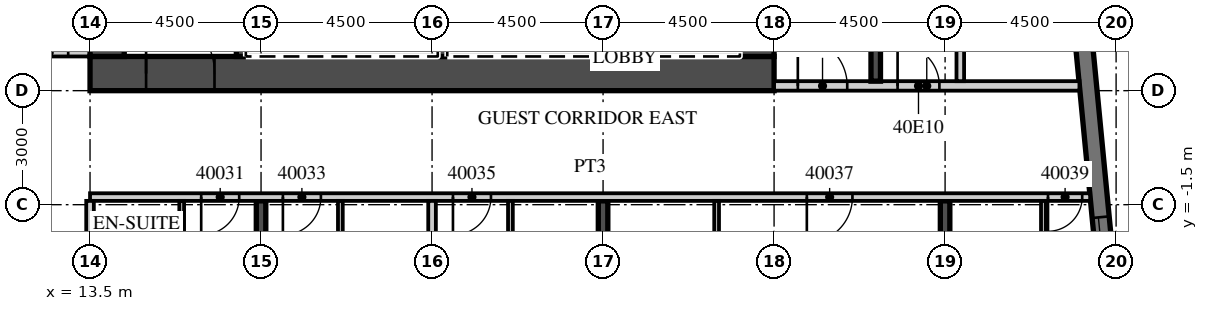
"""IFC4 building model, lengths in metres.
Left out: names, types, materials, properties, quantities, classifications, styles, units other than length and angle.
Written with IfcOpenShell. Run it as: python <this file> out.ifc"""

import sys

from ifc_helpers import new_model, si_unit, direction, frame, frame_2d, origin, place, context, subcontext, project, spatial, rectangle, extrude, element, fill, save


model = new_model("IFC4")
c1 = context("Model", 3, precision=1e-05, world=origin(), true_north=direction((0.0, 1.0)))
c2 = subcontext(c1, "Body", "Model", "MODEL_VIEW")
j1 = project(units=[si_unit("LENGTHUNIT", "METRE"), si_unit("PLANEANGLEUNIT", "RADIAN")], contexts=[c1])
p1 = place(None, origin())
s1 = spatial("IfcSite", under=j1, at=p1, CompositionType="ELEMENT")
p2 = place(p1, origin())
s2 = spatial("IfcBuilding", under=s1, at=p2, CompositionType="ELEMENT")
p3 = place(p2, frame((0.0, 0.0, 173.5)))
s3 = spatial("IfcBuildingStorey", under=s2, at=p3, CompositionType="ELEMENT", Elevation=173.5)
p4 = place(p3, frame((18.0, -19.245, 0.0), z_axis=(0.0, 0.0, 1.0), x_axis=(0.0, 1.0, 0.0)))
e1 = element("IfcWall", 1, at=p4, inside=s3, PredefinedType="SHEAR", context=c2, shape_type="SweptSolid", body=[
    extrude(rectangle(XDim=17.845, YDim=0.25, at=frame_2d((8.923, 0.0))), origin(), (0.0, 0.0, 1.0), 3.3),
])
p5 = place(p3, frame((27.0, -18.379, 0.0), z_axis=(0.0, 0.0, 1.0), x_axis=(0.0, 1.0, 0.0)))
e2 = element("IfcWall", 2, at=p5, inside=s3, PredefinedType="SHEAR", context=c2, shape_type="SweptSolid", body=[
    extrude(rectangle(XDim=16.979, YDim=0.25, at=frame_2d((8.489, 0.0))), origin(), (0.0, 0.0, 1.0), 3.3),
])
p6 = place(p3, frame((36.0, -17.512, 0.0), z_axis=(0.0, 0.0, 1.0), x_axis=(0.0, 1.0, 0.0)))
e3 = element("IfcWall", 3, at=p6, inside=s3, PredefinedType="SHEAR", context=c2, shape_type="SweptSolid", body=[
    extrude(rectangle(XDim=16.112, YDim=0.25, at=frame_2d((8.056, 0.0))), origin(), (0.0, 0.0, 1.0), 3.3),
])
p7 = place(p3, frame((41.214, -13.466, 0.0), z_axis=(0.0, 0.0, 1.0), x_axis=(-0.095847314626, 0.995396047952, 0.0)))
e4 = element("IfcWall", 4, at=p7, inside=s3, PredefinedType="SOLIDWALL", context=c2, shape_type="SweptSolid", body=[
    extrude(rectangle(XDim=34.0, YDim=0.45, at=frame_2d((17.0, 0.0))), origin(), (0.0, 0.0, 1.0), 3.02),
])
p8 = place(p7, frame((3.869, 0.0, 0.45)))
e5 = element("IfcOpeningElement", 5, at=p8, cuts=e4, PredefinedType="OPENING", context=c2, shape_type="SweptSolid", body=[
    extrude(rectangle(XDim=3.3, YDim=2.25, at=frame_2d((1.65, 1.125))), frame((0.0, 0.235, 0.0), z_axis=(0.0, -1.0, 0.0), x_axis=(1.0, 0.0, 0.0)), (0.0, 0.0, 1.0), 0.47),
])
p9 = place(p7, frame((8.39, 0.0, 0.45)))
e6 = element("IfcOpeningElement", 6, at=p9, cuts=e4, PredefinedType="OPENING", context=c2, shape_type="SweptSolid", body=[
    extrude(rectangle(XDim=3.3, YDim=2.25, at=frame_2d((1.65, 1.125))), frame((0.0, 0.235, 0.0), z_axis=(0.0, -1.0, 0.0), x_axis=(1.0, 0.0, 0.0)), (0.0, 0.0, 1.0), 0.47),
])
p10 = place(p3, frame((-13.5, 2.5, 0.0), z_axis=(0.0, 0.0, 1.0), x_axis=(1.0, 0.0, 0.0)))
e7 = element("IfcWall", 7, at=p10, inside=s3, PredefinedType="PARTITIONING", context=c2, shape_type="SweptSolid", body=[
    extrude(rectangle(XDim=27.0, YDim=0.2, at=frame_2d((13.5, 0.0))), origin(), (0.0, 0.0, 1.0), 3.02),
])
p11 = place(p10, frame((0.575, 0.0, 0.0)))
e8 = element("IfcOpeningElement", 8, at=p11, cuts=e7, PredefinedType="OPENING", context=c2, shape_type="SweptSolid", body=[
    extrude(rectangle(XDim=1.0, YDim=2.1, at=frame_2d((0.5, 1.05))), frame((0.0, 0.11, 0.0), z_axis=(0.0, -1.0, 0.0), x_axis=(1.0, 0.0, 0.0)), (0.0, 0.0, 1.0), 0.22),
])
p12 = place(p10, frame((7.45, 0.0, 0.0)))
e9 = element("IfcOpeningElement", 9, at=p12, cuts=e7, PredefinedType="OPENING", context=c2, shape_type="SweptSolid", body=[
    extrude(rectangle(XDim=1.0, YDim=2.1, at=frame_2d((0.5, 1.05))), frame((0.0, 0.11, 0.0), z_axis=(0.0, -1.0, 0.0), x_axis=(1.0, 0.0, 0.0)), (0.0, 0.0, 1.0), 0.22),
])
p13 = place(p10, frame((11.925, 0.0, 0.0)))
e10 = element("IfcOpeningElement", 10, at=p13, cuts=e7, PredefinedType="OPENING", context=c2, shape_type="SweptSolid", body=[
    extrude(rectangle(XDim=1.0, YDim=2.1, at=frame_2d((0.5, 1.05))), frame((0.0, 0.11, 0.0), z_axis=(0.0, -1.0, 0.0), x_axis=(1.0, 0.0, 0.0)), (0.0, 0.0, 1.0), 0.22),
])
p14 = place(p10, frame((15.938, 0.0, 0.0)))
e11 = element("IfcOpeningElement", 11, at=p14, cuts=e7, PredefinedType="OPENING", context=c2, shape_type="SweptSolid", body=[
    extrude(rectangle(XDim=1.2, YDim=2.1, at=frame_2d((0.6, 1.05))), frame((0.0, 0.11, 0.0), z_axis=(0.0, -1.0, 0.0), x_axis=(1.0, 0.0, 0.0)), (0.0, 0.0, 1.0), 0.22),
])
p15 = place(p10, frame((25.425, 0.0, 0.0)))
e12 = element("IfcOpeningElement", 12, at=p15, cuts=e7, PredefinedType="OPENING", context=c2, shape_type="SweptSolid", body=[
    extrude(rectangle(XDim=1.0, YDim=2.1, at=frame_2d((0.5, 1.05))), frame((0.0, 0.11, 0.0), z_axis=(0.0, -1.0, 0.0), x_axis=(1.0, 0.0, 0.0)), (0.0, 0.0, 1.0), 0.22),
])
p16 = place(p3, frame((13.5, -1.3, 0.0), z_axis=(0.0, 0.0, 1.0), x_axis=(1.0, 0.0, 0.0)))
e13 = element("IfcWall", 13, at=p16, inside=s3, PredefinedType="PARTITIONING", context=c2, shape_type="SweptSolid", body=[
    extrude(rectangle(XDim=26.317, YDim=0.2, at=frame_2d((13.158, 0.0))), origin(), (0.0, 0.0, 1.0), 3.02),
])
p17 = place(p16, frame((2.925, 0.0, 0.0)))
e14 = element("IfcOpeningElement", 14, at=p17, cuts=e13, PredefinedType="OPENING", context=c2, shape_type="SweptSolid", body=[
    extrude(rectangle(XDim=1.0, YDim=2.1, at=frame_2d((0.5, 1.05))), frame((0.0, 0.11, 0.0), z_axis=(0.0, -1.0, 0.0), x_axis=(1.0, 0.0, 0.0)), (0.0, 0.0, 1.0), 0.22),
])
p18 = place(p16, frame((5.075, 0.0, 0.0)))
e15 = element("IfcOpeningElement", 15, at=p18, cuts=e13, PredefinedType="OPENING", context=c2, shape_type="SweptSolid", body=[
    extrude(rectangle(XDim=1.0, YDim=2.1, at=frame_2d((0.5, 1.05))), frame((0.0, 0.11, 0.0), z_axis=(0.0, -1.0, 0.0), x_axis=(1.0, 0.0, 0.0)), (0.0, 0.0, 1.0), 0.22),
])
p19 = place(p16, frame((9.55, 0.0, 0.0)))
e16 = element("IfcOpeningElement", 16, at=p19, cuts=e13, PredefinedType="OPENING", context=c2, shape_type="SweptSolid", body=[
    extrude(rectangle(XDim=1.0, YDim=2.1, at=frame_2d((0.5, 1.05))), frame((0.0, 0.11, 0.0), z_axis=(0.0, -1.0, 0.0), x_axis=(1.0, 0.0, 0.0)), (0.0, 0.0, 1.0), 0.22),
])
p20 = place(p16, frame((18.862, 0.0, 0.0)))
e17 = element("IfcOpeningElement", 17, at=p20, cuts=e13, PredefinedType="OPENING", context=c2, shape_type="SweptSolid", body=[
    extrude(rectangle(XDim=1.2, YDim=2.1, at=frame_2d((0.6, 1.05))), frame((0.0, 0.11, 0.0), z_axis=(0.0, -1.0, 0.0), x_axis=(1.0, 0.0, 0.0)), (0.0, 0.0, 1.0), 0.22),
])
p21 = place(p16, frame((25.208, 0.0, 0.0)))
e18 = element("IfcOpeningElement", 18, at=p21, cuts=e13, PredefinedType="OPENING", context=c2, shape_type="SweptSolid", body=[
    extrude(rectangle(XDim=0.9, YDim=2.1, at=frame_2d((0.45, 1.05))), frame((0.0, 0.11, 0.0), z_axis=(0.0, -1.0, 0.0), x_axis=(1.0, 0.0, 0.0)), (0.0, 0.0, 1.0), 0.22),
])
p22 = place(p3, frame((13.5, -19.701, 0.0), z_axis=(0.0, 0.0, 1.0), x_axis=(0.0, 1.0, 0.0)))
e19 = element("IfcWall", 19, at=p22, inside=s3, PredefinedType="PARTITIONING", context=c2, shape_type="SweptSolid", body=[
    extrude(rectangle(XDim=18.301, YDim=0.2, at=frame_2d((9.15, 0.0))), origin(), (0.0, 0.0, 1.0), 3.02),
])
p23 = place(p3, frame((15.912, -7.125, 0.0), z_axis=(0.0, 0.0, 1.0), x_axis=(0.0, 1.0, 0.0)))
e20 = element("IfcWall", 20, at=p23, inside=s3, PredefinedType="PARTITIONING", context=c2, shape_type="SweptSolid", body=[
    extrude(rectangle(XDim=5.725, YDim=0.125, at=frame_2d((2.863, 0.0))), origin(), (0.0, 0.0, 1.0), 3.02),
])
p24 = place(p23, frame((2.375, 0.0, 0.0)))
e21 = element("IfcOpeningElement", 21, at=p24, cuts=e20, PredefinedType="OPENING", context=c2, shape_type="SweptSolid", body=[
    extrude(rectangle(XDim=0.9, YDim=2.1, at=frame_2d((0.45, 1.05))), frame((0.0, 0.073, 0.0), z_axis=(0.0, -1.0, 0.0), x_axis=(1.0, 0.0, 0.0)), (0.0, 0.0, 1.0), 0.145),
])
p25 = place(p3, frame((22.5, -18.834, 0.0), z_axis=(0.0, 0.0, 1.0), x_axis=(0.0, 1.0, 0.0)))
e22 = element("IfcWall", 22, at=p25, inside=s3, PredefinedType="PARTITIONING", context=c2, shape_type="SweptSolid", body=[
    extrude(rectangle(XDim=17.434, YDim=0.2, at=frame_2d((8.717, 0.0))), origin(), (0.0, 0.0, 1.0), 3.02),
])
p26 = place(p3, frame((20.087, -7.125, 0.0), z_axis=(0.0, 0.0, 1.0), x_axis=(0.0, 1.0, 0.0)))
e23 = element("IfcWall", 23, at=p26, inside=s3, PredefinedType="PARTITIONING", context=c2, shape_type="SweptSolid", body=[
    extrude(rectangle(XDim=5.725, YDim=0.125, at=frame_2d((2.863, 0.0))), origin(), (0.0, 0.0, 1.0), 3.02),
])
p27 = place(p26, frame((2.375, 0.0, 0.0)))
e24 = element("IfcOpeningElement", 24, at=p27, cuts=e23, PredefinedType="OPENING", context=c2, shape_type="SweptSolid", body=[
    extrude(rectangle(XDim=0.9, YDim=2.1, at=frame_2d((0.45, 1.05))), frame((0.0, 0.073, 0.0), z_axis=(0.0, -1.0, 0.0), x_axis=(1.0, 0.0, 0.0)), (0.0, 0.0, 1.0), 0.145),
])
p28 = place(p3, frame((24.562, -7.125, 0.0), z_axis=(0.0, 0.0, 1.0), x_axis=(0.0, 1.0, 0.0)))
e25 = element("IfcWall", 25, at=p28, inside=s3, PredefinedType="PARTITIONING", context=c2, shape_type="SweptSolid", body=[
    extrude(rectangle(XDim=5.725, YDim=0.125, at=frame_2d((2.863, 0.0))), origin(), (0.0, 0.0, 1.0), 3.02),
])
p29 = place(p28, frame((2.375, 0.0, 0.0)))
e26 = element("IfcOpeningElement", 26, at=p29, cuts=e25, PredefinedType="OPENING", context=c2, shape_type="SweptSolid", body=[
    extrude(rectangle(XDim=0.9, YDim=2.1, at=frame_2d((0.45, 1.05))), frame((0.0, 0.073, 0.0), z_axis=(0.0, -1.0, 0.0), x_axis=(1.0, 0.0, 0.0)), (0.0, 0.0, 1.0), 0.145),
])
p30 = place(p3, frame((29.988, -7.125, 0.0), z_axis=(0.0, 0.0, 1.0), x_axis=(0.0, 1.0, 0.0)))
e27 = element("IfcWall", 27, at=p30, inside=s3, PredefinedType="PARTITIONING", context=c2, shape_type="SweptSolid", body=[
    extrude(rectangle(XDim=5.725, YDim=0.125, at=frame_2d((2.863, 0.0))), origin(), (0.0, 0.0, 1.0), 3.02),
])
p31 = place(p30, frame((2.375, 0.0, 0.0)))
e28 = element("IfcOpeningElement", 28, at=p31, cuts=e27, PredefinedType="OPENING", context=c2, shape_type="SweptSolid", body=[
    extrude(rectangle(XDim=0.9, YDim=2.1, at=frame_2d((0.45, 1.05))), frame((0.0, 0.073, 0.0), z_axis=(0.0, -1.0, 0.0), x_axis=(1.0, 0.0, 0.0)), (0.0, 0.0, 1.0), 0.145),
])
p32 = place(p3, frame((38.587, -6.445, 0.0), z_axis=(0.0, 0.0, 1.0), x_axis=(0.0, 1.0, 0.0)))
e29 = element("IfcWall", 29, at=p32, inside=s3, PredefinedType="PARTITIONING", context=c2, shape_type="SweptSolid", body=[
    extrude(rectangle(XDim=5.045, YDim=0.125, at=frame_2d((2.522, 0.0))), origin(), (0.0, 0.0, 1.0), 3.02),
])
p33 = place(p32, frame((1.695, 0.0, 0.0)))
e30 = element("IfcOpeningElement", 30, at=p33, cuts=e29, PredefinedType="OPENING", context=c2, shape_type="SweptSolid", body=[
    extrude(rectangle(XDim=0.9, YDim=2.1, at=frame_2d((0.45, 1.05))), frame((0.0, 0.073, 0.0), z_axis=(0.0, -1.0, 0.0), x_axis=(1.0, 0.0, 0.0)), (0.0, 0.0, 1.0), 0.145),
])
p34 = place(p3, frame((13.5, 1.95, 0.0), z_axis=(0.0, 0.0, 1.0), x_axis=(1.0, 0.0, 0.0)))
e31 = element("IfcWall", 31, at=p34, inside=s3, PredefinedType="SHEAR", context=c2, shape_type="SweptSolid", body=[
    extrude(rectangle(XDim=18.0, YDim=0.9, at=frame_2d((9.0, 0.0))), origin(), (0.0, 0.0, 1.0), 3.02),
])
p35 = place(p34, frame((1.475, 0.0, 0.0)))
e32 = element("IfcOpeningElement", 32, at=p35, cuts=e31, PredefinedType="OPENING", context=c2, shape_type="SweptSolid", body=[
    extrude(rectangle(XDim=1.8, YDim=2.1, at=frame_2d((0.9, 1.05))), frame((0.0, 0.46, 0.0), z_axis=(0.0, -1.0, 0.0), x_axis=(1.0, 0.0, 0.0)), (0.0, 0.0, 1.0), 0.92),
])
p36 = place(p3, frame((31.05, 2.4, 0.0), z_axis=(0.0, 0.0, 1.0), x_axis=(0.0, 1.0, 0.0)))
e33 = element("IfcWall", 33, at=p36, inside=s3, PredefinedType="SHEAR", context=c2, shape_type="SweptSolid", body=[
    extrude(rectangle(XDim=12.8, YDim=0.9, at=frame_2d((6.4, 0.0))), origin(), (0.0, 0.0, 1.0), 3.02),
])
p37 = place(p36, frame((0.2, 0.0, 0.0)))
e34 = element("IfcOpeningElement", 34, at=p37, cuts=e33, PredefinedType="OPENING", context=c2, shape_type="SweptSolid", body=[
    extrude(rectangle(XDim=1.1, YDim=2.1, at=frame_2d((0.55, 1.05))), frame((0.0, 0.46, 0.0), z_axis=(0.0, -1.0, 0.0), x_axis=(1.0, 0.0, 0.0)), (0.0, 0.0, 1.0), 0.92),
])
p38 = place(p3, frame((13.95, 2.4, 0.0), z_axis=(0.0, 0.0, 1.0), x_axis=(0.0, 1.0, 0.0)))
e35 = element("IfcWall", 35, at=p38, inside=s3, PredefinedType="SHEAR", context=c2, shape_type="SweptSolid", body=[
    extrude(rectangle(XDim=12.2, YDim=0.9, at=frame_2d((6.1, 0.0))), origin(), (0.0, 0.0, 1.0), 3.02),
])
p39 = place(p3, frame((17.475, 2.4, 0.0), z_axis=(0.0, 0.0, 1.0), x_axis=(0.0, 1.0, 0.0)))
e36 = element("IfcWall", 36, at=p39, inside=s3, PredefinedType="SHEAR", context=c2, shape_type="SweptSolid", body=[
    extrude(rectangle(XDim=3.15, YDim=0.25, at=frame_2d((1.575, 0.0))), origin(), (0.0, 0.0, 1.0), 3.02),
])
for number, where, z_axis, x_axis in (
    (37, (27.975, 2.4, 0.0), (0.0, 0.0, 1.0), (0.0, 1.0, 0.0)),
    (38, (22.775, 2.4, 0.0), (0.0, 0.0, 1.0), (0.0, 1.0, 0.0)),
):
    element("IfcWall", number, at=place(p3, frame(where, z_axis=z_axis, x_axis=x_axis)), inside=s3, PredefinedType="SHEAR", context=c2, shape_type="SweptSolid", body=[
        extrude(rectangle(XDim=2.9, YDim=0.25, at=frame_2d((1.45, 0.0))), origin(), (0.0, 0.0, 1.0), 3.02),
    ])
p40 = place(p3, frame((31.5, 1.625, 0.0), z_axis=(0.0, 0.0, 1.0), x_axis=(1.0, 0.0, 0.0)))
e39 = element("IfcWall", 39, at=p40, inside=s3, PredefinedType="PARTITIONING", context=c2, shape_type="SweptSolid", body=[
    extrude(rectangle(XDim=8.035, YDim=0.25, at=frame_2d((4.018, 0.0))), origin(), (0.0, 0.0, 1.0), 3.02),
])
p41 = place(p40, frame((0.625, 0.0, 0.0)))
e40 = element("IfcOpeningElement", 40, at=p41, cuts=e39, PredefinedType="OPENING", context=c2, shape_type="SweptSolid", body=[
    extrude(rectangle(XDim=1.3, YDim=2.1, at=frame_2d((0.65, 1.05))), frame((0.0, 0.135, 0.0), z_axis=(0.0, -1.0, 0.0), x_axis=(1.0, 0.0, 0.0)), (0.0, 0.0, 1.0), 0.27),
])
p42 = place(p40, frame((3.25, 0.0, 0.0)))
e41 = element("IfcOpeningElement", 41, at=p42, cuts=e39, PredefinedType="OPENING", context=c2, shape_type="SweptSolid", body=[
    extrude(rectangle(XDim=1.1, YDim=2.1, at=frame_2d((0.55, 1.05))), frame((0.0, 0.135, 0.0), z_axis=(0.0, -1.0, 0.0), x_axis=(1.0, 0.0, 0.0)), (0.0, 0.0, 1.0), 0.27),
])
p43 = place(p3, frame((34.175, 1.75, 0.0), z_axis=(0.0, 0.0, 1.0), x_axis=(0.0, 1.0, 0.0)))
e42 = element("IfcWall", 42, at=p43, inside=s3, PredefinedType="SHEAR", context=c2, shape_type="SweptSolid", body=[
    extrude(rectangle(XDim=8.35, YDim=0.25, at=frame_2d((4.175, 0.0))), origin(), (0.0, 0.0, 1.0), 3.02),
])
p44 = place(p3, frame((36.4, 1.75, 0.0), z_axis=(0.0, 0.0, 1.0), x_axis=(0.0, 1.0, 0.0)))
e43 = element("IfcWall", 43, at=p44, inside=s3, PredefinedType="PARTITIONING", context=c2, shape_type="SweptSolid", body=[
    extrude(rectangle(XDim=15.95, YDim=0.2, at=frame_2d((7.975, 0.0))), origin(), (0.0, 0.0, 1.0), 3.02),
])
p45 = place(p44, frame((14.7, 0.0, 0.0)))
e44 = element("IfcOpeningElement", 44, at=p45, cuts=e43, PredefinedType="OPENING", context=c2, shape_type="SweptSolid", body=[
    extrude(rectangle(XDim=0.9, YDim=2.1, at=frame_2d((0.45, 1.05))), frame((0.0, 0.11, 0.0), z_axis=(0.0, -1.0, 0.0), x_axis=(1.0, 0.0, 0.0)), (0.0, 0.0, 1.0), 0.22),
])
p46 = place(p9, origin())
e45 = element("IfcWindow", 45, at=p46, inside=s3, PartitioningType="SINGLE_PANEL", PredefinedType="WINDOW", context=c2, shape_type="SweptSolid", body=[
    extrude(rectangle(XDim=3.3, YDim=2.25, at=frame_2d((1.65, 1.125))), frame((0.0, 0.09, 0.0), z_axis=(0.0, -1.0, 0.0), x_axis=(1.0, 0.0, 0.0)), (0.0, 0.0, 1.0), 0.06),
])
fill(e6, e45)
p47 = place(p15, origin())
e46 = element("IfcDoor", 46, at=p47, inside=s3, OperationType="SINGLE_SWING_LEFT", PredefinedType="DOOR", context=c2, shape_type="SweptSolid", body=[
    extrude(rectangle(XDim=1.0, YDim=2.1, at=frame_2d((0.5, 1.05))), frame((0.0, 0.025, 0.0), z_axis=(0.0, -1.0, 0.0), x_axis=(1.0, 0.0, 0.0)), (0.0, 0.0, 1.0), 0.05),
])
fill(e12, e46)
p48 = place(p17, origin())
e47 = element("IfcDoor", 47, at=p48, inside=s3, OperationType="SINGLE_SWING_LEFT", PredefinedType="DOOR", context=c2, shape_type="SweptSolid", body=[
    extrude(rectangle(XDim=1.0, YDim=2.1, at=frame_2d((0.5, 1.05))), frame((0.0, 0.025, 0.0), z_axis=(0.0, -1.0, 0.0), x_axis=(1.0, 0.0, 0.0)), (0.0, 0.0, 1.0), 0.05),
])
fill(e14, e47)
p49 = place(p18, origin())
e48 = element("IfcDoor", 48, at=p49, inside=s3, OperationType="SINGLE_SWING_LEFT", PredefinedType="DOOR", context=c2, shape_type="SweptSolid", body=[
    extrude(rectangle(XDim=1.0, YDim=2.1, at=frame_2d((0.5, 1.05))), frame((0.0, 0.025, 0.0), z_axis=(0.0, -1.0, 0.0), x_axis=(1.0, 0.0, 0.0)), (0.0, 0.0, 1.0), 0.05),
])
fill(e15, e48)
p50 = place(p19, origin())
e49 = element("IfcDoor", 49, at=p50, inside=s3, OperationType="SINGLE_SWING_LEFT", PredefinedType="DOOR", context=c2, shape_type="SweptSolid", body=[
    extrude(rectangle(XDim=1.0, YDim=2.1, at=frame_2d((0.5, 1.05))), frame((0.0, 0.025, 0.0), z_axis=(0.0, -1.0, 0.0), x_axis=(1.0, 0.0, 0.0)), (0.0, 0.0, 1.0), 0.05),
])
fill(e16, e49)
p51 = place(p20, origin())
e50 = element("IfcDoor", 50, at=p51, inside=s3, OperationType="SINGLE_SWING_LEFT", PredefinedType="DOOR", context=c2, shape_type="SweptSolid", body=[
    extrude(rectangle(XDim=1.2, YDim=2.1, at=frame_2d((0.6, 1.05))), frame((0.0, 0.025, 0.0), z_axis=(0.0, -1.0, 0.0), x_axis=(1.0, 0.0, 0.0)), (0.0, 0.0, 1.0), 0.05),
])
fill(e17, e50)
p52 = place(p21, origin())
e51 = element("IfcDoor", 51, at=p52, inside=s3, OperationType="SINGLE_SWING_LEFT", PredefinedType="DOOR", context=c2, shape_type="SweptSolid", body=[
    extrude(rectangle(XDim=0.9, YDim=2.1, at=frame_2d((0.45, 1.05))), frame((0.0, 0.025, 0.0), z_axis=(0.0, -1.0, 0.0), x_axis=(1.0, 0.0, 0.0)), (0.0, 0.0, 1.0), 0.05),
])
fill(e18, e51)
p53 = place(p35, origin())
e52 = element("IfcDoor", 52, at=p53, inside=s3, OperationType="DOUBLE_DOOR_DOUBLE_SWING", PredefinedType="DOOR", context=c2, shape_type="SweptSolid", body=[
    extrude(rectangle(XDim=1.8, YDim=2.1, at=frame_2d((0.9, 1.05))), frame((0.0, 0.025, 0.0), z_axis=(0.0, -1.0, 0.0), x_axis=(1.0, 0.0, 0.0)), (0.0, 0.0, 1.0), 0.05),
])
fill(e32, e52)
p54 = place(p41, origin())
e53 = element("IfcDoor", 53, at=p54, inside=s3, OperationType="SINGLE_SWING_LEFT", PredefinedType="DOOR", context=c2, shape_type="SweptSolid", body=[
    extrude(rectangle(XDim=1.3, YDim=2.1, at=frame_2d((0.65, 1.05))), frame((0.0, 0.025, 0.0), z_axis=(0.0, -1.0, 0.0), x_axis=(1.0, 0.0, 0.0)), (0.0, 0.0, 1.0), 0.05),
])
fill(e40, e53)
p55 = place(p42, origin())
e54 = element("IfcDoor", 54, at=p55, inside=s3, OperationType="SINGLE_SWING_LEFT", PredefinedType="DOOR", context=c2, shape_type="SweptSolid", body=[
    extrude(rectangle(XDim=1.1, YDim=2.1, at=frame_2d((0.55, 1.05))), frame((0.0, 0.025, 0.0), z_axis=(0.0, -1.0, 0.0), x_axis=(1.0, 0.0, 0.0)), (0.0, 0.0, 1.0), 0.05),
])
fill(e41, e54)
save(model, sys.argv[1])
